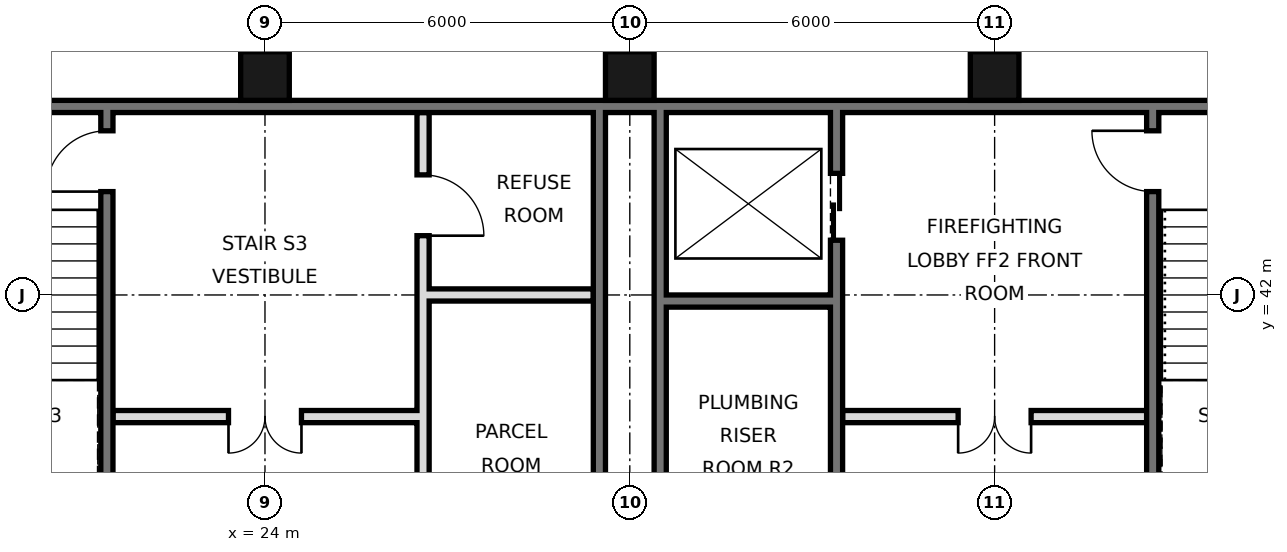
"""IFC4 building model, lengths in metres.
Left out: names, types, materials, properties, quantities, classifications, styles, units other than length and angle.
Written with IfcOpenShell. Run it as: python <this file> out.ifc"""

import sys

from ifc_helpers import new_model, si_unit, direction, frame, frame_2d, origin, origin_2d, place, context, subcontext, project, spatial, rectangle, hollow_rectangle, extrude, element, fill, save


model = new_model("IFC4")
c1 = context("Model", 3, precision=1e-05, world=origin(), true_north=direction((0.0, 1.0)))
c2 = subcontext(c1, "Body", "Model", "MODEL_VIEW")
j1 = project(units=[si_unit("LENGTHUNIT", "METRE"), si_unit("PLANEANGLEUNIT", "RADIAN")], contexts=[c1])
p1 = place(None, origin())
s1 = spatial("IfcSite", under=j1, at=p1, CompositionType="ELEMENT")
p2 = place(p1, origin())
s2 = spatial("IfcBuilding", under=s1, at=p2, CompositionType="ELEMENT")
p3 = place(p2, frame((0.0, 0.0, 308.8)))
s3 = spatial("IfcBuildingStorey", under=s2, at=p3, CompositionType="ELEMENT", Elevation=308.8)
for number, where, z_axis, x_axis in (
    (1, (24.0, 45.6, 0.0), (0.0, 0.0, 1.0), (1.0, 0.0, 0.0)),
    (2, (30.0, 45.6, 0.0), (0.0, 0.0, 1.0), (1.0, 0.0, 0.0)),
    (3, (36.0, 45.6, 0.0), (0.0, 0.0, 1.0), (1.0, 0.0, 0.0)),
):
    element("IfcColumn", number, at=place(p3, frame(where, z_axis=z_axis, x_axis=x_axis)), inside=s3, PredefinedType="COLUMN", context=c2, shape_type="SweptSolid", body=[
        extrude(hollow_rectangle(XDim=0.8, YDim=0.8, WallThickness=0.025, at=origin_2d()), origin(), (0.0, 0.0, 1.0), 3.6),
    ])
p4 = place(p3, frame((6.6, 45.1, 0.0), z_axis=(0.0, 0.0, 1.0), x_axis=(1.0, 0.0, 0.0)))
e4 = element("IfcWall", 4, at=p4, inside=s3, PredefinedType="SOLIDWALL", context=c2, shape_type="SweptSolid", body=[
    extrude(rectangle(XDim=34.8, YDim=0.2, at=frame_2d((17.4, 0.0))), origin(), (0.0, 0.0, 1.0), 3.42),
])
for number, where, z_axis, x_axis in (
    (5, (29.5, 27.6, 0.0), (0.0, 0.0, 1.0), (0.0, 1.0, 0.0)),
    (6, (30.5, 27.6, 0.0), (0.0, 0.0, 1.0), (0.0, 1.0, 0.0)),
):
    element("IfcWall", number, at=place(p3, frame(where, z_axis=z_axis, x_axis=x_axis)), inside=s3, PredefinedType="SOLIDWALL", context=c2, shape_type="SweptSolid", body=[
        extrude(rectangle(XDim=17.5, YDim=0.2, at=frame_2d((8.75, 0.0))), origin(), (0.0, 0.0, 1.0), 3.42),
    ])
p5 = place(p3, frame((21.4, 27.5, 0.0), z_axis=(0.0, 0.0, 1.0), x_axis=(0.0, 1.0, 0.0)))
e7 = element("IfcWall", 7, at=p5, inside=s3, PredefinedType="SOLIDWALL", context=c2, shape_type="SweptSolid", body=[
    extrude(rectangle(XDim=17.5, YDim=0.2, at=frame_2d((8.75, 0.0))), origin(), (0.0, 0.0, 1.0), 3.42),
])
p6 = place(p5, frame((0.55, 0.0, 0.0)))
e8 = element("IfcOpeningElement", 8, at=p6, cuts=e7, PredefinedType="OPENING", context=c2, shape_type="SweptSolid", body=[
    extrude(rectangle(XDim=1.0, YDim=2.1, at=frame_2d((0.5, 1.05))), frame((0.0, 0.11, 0.0), z_axis=(0.0, -1.0, 0.0), x_axis=(1.0, 0.0, 0.0)), (0.0, 0.0, 1.0), 0.22),
])
p7 = place(p5, frame((3.65, 0.0, 0.0)))
e9 = element("IfcOpeningElement", 9, at=p7, cuts=e7, PredefinedType="OPENING", context=c2, shape_type="SweptSolid", body=[
    extrude(rectangle(XDim=1.0, YDim=2.1, at=frame_2d((0.5, 1.05))), frame((0.0, 0.11, 0.0), z_axis=(0.0, -1.0, 0.0), x_axis=(1.0, 0.0, 0.0)), (0.0, 0.0, 1.0), 0.22),
])
p8 = place(p5, frame((16.2, 0.0, 0.0)))
e10 = element("IfcOpeningElement", 10, at=p8, cuts=e7, PredefinedType="OPENING", context=c2, shape_type="SweptSolid", body=[
    extrude(rectangle(XDim=1.0, YDim=2.1, at=frame_2d((0.5, 1.05))), frame((0.0, 0.11, 0.0), z_axis=(0.0, -1.0, 0.0), x_axis=(1.0, 0.0, 0.0)), (0.0, 0.0, 1.0), 0.22),
])
p9 = place(p5, frame((7.4, 0.0, 0.0)))
e11 = element("IfcOpeningElement", 11, at=p9, cuts=e7, PredefinedType="OPENING", context=c2, shape_type="SweptSolid", body=[
    extrude(rectangle(XDim=0.9, YDim=2.1, at=frame_2d((0.45, 1.05))), frame((0.0, 0.11, 0.0), z_axis=(0.0, -1.0, 0.0), x_axis=(1.0, 0.0, 0.0)), (0.0, 0.0, 1.0), 0.22),
])
p10 = place(p3, frame((26.6, 27.5, 0.0), z_axis=(0.0, 0.0, 1.0), x_axis=(0.0, 1.0, 0.0)))
e12 = element("IfcWall", 12, at=p10, inside=s3, PredefinedType="SOLIDWALL", context=c2, shape_type="SweptSolid", body=[
    extrude(rectangle(XDim=17.5, YDim=0.2, at=frame_2d((8.75, 0.0))), origin(), (0.0, 0.0, 1.0), 3.42),
])
p11 = place(p10, frame((4.3, 0.0, 0.0)))
e13 = element("IfcOpeningElement", 13, at=p11, cuts=e12, PredefinedType="OPENING", context=c2, shape_type="SweptSolid", body=[
    extrude(rectangle(XDim=0.9, YDim=2.1, at=frame_2d((0.45, 1.05))), frame((0.0, 0.11, 0.0), z_axis=(0.0, -1.0, 0.0), x_axis=(1.0, 0.0, 0.0)), (0.0, 0.0, 1.0), 0.22),
])
p12 = place(p10, frame((10.35, 0.0, 0.0)))
e14 = element("IfcOpeningElement", 14, at=p12, cuts=e12, PredefinedType="OPENING", context=c2, shape_type="SweptSolid", body=[
    extrude(rectangle(XDim=1.0, YDim=2.1, at=frame_2d((0.5, 1.05))), frame((0.0, 0.11, 0.0), z_axis=(0.0, -1.0, 0.0), x_axis=(1.0, 0.0, 0.0)), (0.0, 0.0, 1.0), 0.22),
])
p13 = place(p10, frame((15.475, 0.0, 0.0)))
e15 = element("IfcOpeningElement", 15, at=p13, cuts=e12, PredefinedType="OPENING", context=c2, shape_type="SweptSolid", body=[
    extrude(rectangle(XDim=1.0, YDim=2.1, at=frame_2d((0.5, 1.05))), frame((0.0, 0.11, 0.0), z_axis=(0.0, -1.0, 0.0), x_axis=(1.0, 0.0, 0.0)), (0.0, 0.0, 1.0), 0.22),
])
p14 = place(p3, frame((33.4, 27.5, 0.0), z_axis=(0.0, 0.0, 1.0), x_axis=(0.0, 1.0, 0.0)))
e16 = element("IfcWall", 16, at=p14, inside=s3, PredefinedType="SOLIDWALL", context=c2, shape_type="SweptSolid", body=[
    extrude(rectangle(XDim=17.5, YDim=0.2, at=frame_2d((8.75, 0.0))), origin(), (0.0, 0.0, 1.0), 3.42),
])
p15 = place(p14, frame((1.1, 0.0, 0.0)))
e17 = element("IfcOpeningElement", 17, at=p15, cuts=e16, PredefinedType="OPENING", context=c2, shape_type="SweptSolid", body=[
    extrude(rectangle(XDim=1.1, YDim=2.1, at=frame_2d((0.55, 1.05))), frame((0.0, 0.11, 0.0), z_axis=(0.0, -1.0, 0.0), x_axis=(1.0, 0.0, 0.0)), (0.0, 0.0, 1.0), 0.22),
])
p16 = place(p14, frame((4.2, 0.0, 0.0)))
e18 = element("IfcOpeningElement", 18, at=p16, cuts=e16, PredefinedType="OPENING", context=c2, shape_type="SweptSolid", body=[
    extrude(rectangle(XDim=1.1, YDim=2.1, at=frame_2d((0.55, 1.05))), frame((0.0, 0.11, 0.0), z_axis=(0.0, -1.0, 0.0), x_axis=(1.0, 0.0, 0.0)), (0.0, 0.0, 1.0), 0.22),
])
p17 = place(p14, frame((15.4, 0.0, 0.0)))
e19 = element("IfcOpeningElement", 19, at=p17, cuts=e16, PredefinedType="OPENING", context=c2, shape_type="SweptSolid", body=[
    extrude(rectangle(XDim=1.1, YDim=2.1, at=frame_2d((0.55, 1.05))), frame((0.0, 0.11, 0.0), z_axis=(0.0, -1.0, 0.0), x_axis=(1.0, 0.0, 0.0)), (0.0, 0.0, 1.0), 0.22),
])
p18 = place(p14, frame((9.9, 0.0, 0.0)))
e20 = element("IfcOpeningElement", 20, at=p18, cuts=e16, PredefinedType="OPENING", context=c2, shape_type="SweptSolid", body=[
    extrude(rectangle(XDim=0.9, YDim=2.1, at=frame_2d((0.45, 1.05))), frame((0.0, 0.11, 0.0), z_axis=(0.0, -1.0, 0.0), x_axis=(1.0, 0.0, 0.0)), (0.0, 0.0, 1.0), 0.22),
])
p19 = place(p3, frame((38.6, 21.6, 0.0), z_axis=(0.0, 0.0, 1.0), x_axis=(0.0, 1.0, 0.0)))
e21 = element("IfcWall", 21, at=p19, inside=s3, PredefinedType="SOLIDWALL", context=c2, shape_type="SweptSolid", body=[
    extrude(rectangle(XDim=23.4, YDim=0.2, at=frame_2d((11.7, 0.0))), origin(), (0.0, 0.0, 1.0), 3.42),
])
p20 = place(p19, frame((7.0, 0.0, 0.0)))
e22 = element("IfcOpeningElement", 22, at=p20, cuts=e21, PredefinedType="OPENING", context=c2, shape_type="SweptSolid", body=[
    extrude(rectangle(XDim=1.1, YDim=2.1, at=frame_2d((0.55, 1.05))), frame((0.0, 0.11, 0.0), z_axis=(0.0, -1.0, 0.0), x_axis=(1.0, 0.0, 0.0)), (0.0, 0.0, 1.0), 0.22),
])
p21 = place(p19, frame((10.1, 0.0, 0.0)))
e23 = element("IfcOpeningElement", 23, at=p21, cuts=e21, PredefinedType="OPENING", context=c2, shape_type="SweptSolid", body=[
    extrude(rectangle(XDim=1.1, YDim=2.1, at=frame_2d((0.55, 1.05))), frame((0.0, 0.11, 0.0), z_axis=(0.0, -1.0, 0.0), x_axis=(1.0, 0.0, 0.0)), (0.0, 0.0, 1.0), 0.22),
])
p22 = place(p19, frame((13.2, 0.0, 0.0)))
e24 = element("IfcOpeningElement", 24, at=p22, cuts=e21, PredefinedType="OPENING", context=c2, shape_type="SweptSolid", body=[
    extrude(rectangle(XDim=1.1, YDim=2.1, at=frame_2d((0.55, 1.05))), frame((0.0, 0.11, 0.0), z_axis=(0.0, -1.0, 0.0), x_axis=(1.0, 0.0, 0.0)), (0.0, 0.0, 1.0), 0.22),
])
p23 = place(p19, frame((22.1, 0.0, 0.0)))
e25 = element("IfcOpeningElement", 25, at=p23, cuts=e21, PredefinedType="OPENING", context=c2, shape_type="SweptSolid", body=[
    extrude(rectangle(XDim=1.0, YDim=2.1, at=frame_2d((0.5, 1.05))), frame((0.0, 0.11, 0.0), z_axis=(0.0, -1.0, 0.0), x_axis=(1.0, 0.0, 0.0)), (0.0, 0.0, 1.0), 0.22),
])
p24 = place(p19, frame((0.175, 0.0, 0.0)))
e26 = element("IfcOpeningElement", 26, at=p24, cuts=e21, PredefinedType="OPENING", context=c2, shape_type="SweptSolid", body=[
    extrude(rectangle(XDim=0.9, YDim=2.1, at=frame_2d((0.45, 1.05))), frame((0.0, 0.11, 0.0), z_axis=(0.0, -1.0, 0.0), x_axis=(1.0, 0.0, 0.0)), (0.0, 0.0, 1.0), 0.22),
])
p25 = place(p3, frame((21.5, 40.0, 0.0), z_axis=(0.0, 0.0, 1.0), x_axis=(1.0, 0.0, 0.0)))
e27 = element("IfcWall", 27, at=p25, inside=s3, PredefinedType="PARTITIONING", context=c2, shape_type="SweptSolid", body=[
    extrude(rectangle(XDim=5.0, YDim=0.2, at=frame_2d((2.5, 0.0))), origin(), (0.0, 0.0, 1.0), 3.42),
])
p26 = place(p25, frame((1.9, 0.0, 0.0)))
e28 = element("IfcOpeningElement", 28, at=p26, cuts=e27, PredefinedType="OPENING", context=c2, shape_type="SweptSolid", body=[
    extrude(rectangle(XDim=1.2, YDim=2.1, at=frame_2d((0.6, 1.05))), frame((0.0, 0.11, 0.0), z_axis=(0.0, -1.0, 0.0), x_axis=(1.0, 0.0, 0.0)), (0.0, 0.0, 1.0), 0.22),
])
p27 = place(p3, frame((33.5, 40.0, 0.0), z_axis=(0.0, 0.0, 1.0), x_axis=(1.0, 0.0, 0.0)))
e29 = element("IfcWall", 29, at=p27, inside=s3, PredefinedType="PARTITIONING", context=c2, shape_type="SweptSolid", body=[
    extrude(rectangle(XDim=5.0, YDim=0.2, at=frame_2d((2.5, 0.0))), origin(), (0.0, 0.0, 1.0), 3.42),
])
p28 = place(p27, frame((1.9, 0.0, 0.0)))
e30 = element("IfcOpeningElement", 30, at=p28, cuts=e29, PredefinedType="OPENING", context=c2, shape_type="SweptSolid", body=[
    extrude(rectangle(XDim=1.2, YDim=2.1, at=frame_2d((0.6, 1.05))), frame((0.0, 0.11, 0.0), z_axis=(0.0, -1.0, 0.0), x_axis=(1.0, 0.0, 0.0)), (0.0, 0.0, 1.0), 0.22),
])
p29 = place(p3, frame((30.6, 41.9, 0.0), z_axis=(0.0, 0.0, 1.0), x_axis=(1.0, 0.0, 0.0)))
e31 = element("IfcWall", 31, at=p29, inside=s3, PredefinedType="SOLIDWALL", context=c2, shape_type="SweptSolid", body=[
    extrude(rectangle(XDim=2.7, YDim=0.2, at=frame_2d((1.35, 0.0))), origin(), (0.0, 0.0, 1.0), 3.42),
])
p30 = place(p3, frame((26.7, 42.0, 0.0), z_axis=(0.0, 0.0, 1.0), x_axis=(1.0, 0.0, 0.0)))
e32 = element("IfcWall", 32, at=p30, inside=s3, PredefinedType="PARTITIONING", context=c2, shape_type="SweptSolid", body=[
    extrude(rectangle(XDim=2.7, YDim=0.2, at=frame_2d((1.35, 0.0))), origin(), (0.0, 0.0, 1.0), 3.42),
])
p31 = place(p26, frame((1.2, 0.0, 0.0), z_axis=(0.0, 0.0, 1.0), x_axis=(-1.0, 0.0, 0.0)))
e33 = element("IfcDoor", 33, at=p31, inside=s3, OperationType="DOUBLE_DOOR_SINGLE_SWING", PredefinedType="DOOR", context=c2, shape_type="SweptSolid", body=[
    extrude(rectangle(XDim=1.2, YDim=2.1, at=frame_2d((0.6, 1.05))), frame((0.0, 0.025, 0.0), z_axis=(0.0, -1.0, 0.0), x_axis=(1.0, 0.0, 0.0)), (0.0, 0.0, 1.0), 0.05),
])
fill(e28, e33)
p32 = place(p28, frame((1.2, 0.0, 0.0), z_axis=(0.0, 0.0, 1.0), x_axis=(-1.0, 0.0, 0.0)))
e34 = element("IfcDoor", 34, at=p32, inside=s3, OperationType="DOUBLE_DOOR_SINGLE_SWING", PredefinedType="DOOR", context=c2, shape_type="SweptSolid", body=[
    extrude(rectangle(XDim=1.2, YDim=2.1, at=frame_2d((0.6, 1.05))), frame((0.0, 0.025, 0.0), z_axis=(0.0, -1.0, 0.0), x_axis=(1.0, 0.0, 0.0)), (0.0, 0.0, 1.0), 0.05),
])
fill(e30, e34)
p33 = place(p17, origin())
e35 = element("IfcDoor", 35, at=p33, inside=s3, OperationType="DOUBLE_DOOR_SLIDING", PredefinedType="DOOR", context=c2, shape_type="SweptSolid", body=[
    extrude(rectangle(XDim=1.1, YDim=2.1, at=frame_2d((0.55, 1.05))), frame((0.0, 0.025, 0.0), z_axis=(0.0, -1.0, 0.0), x_axis=(1.0, 0.0, 0.0)), (0.0, 0.0, 1.0), 0.05),
])
fill(e19, e35)
p34 = place(p23, frame((1.0, 0.0, 0.0), z_axis=(0.0, 0.0, 1.0), x_axis=(-1.0, 0.0, 0.0)))
e36 = element("IfcDoor", 36, at=p34, inside=s3, OperationType="SINGLE_SWING_LEFT", PredefinedType="DOOR", context=c2, shape_type="SweptSolid", body=[
    extrude(rectangle(XDim=1.0, YDim=2.1, at=frame_2d((0.5, 1.05))), frame((0.0, 0.025, 0.0), z_axis=(0.0, -1.0, 0.0), x_axis=(1.0, 0.0, 0.0)), (0.0, 0.0, 1.0), 0.05),
])
fill(e25, e36)
p35 = place(p8, origin())
e37 = element("IfcDoor", 37, at=p35, inside=s3, OperationType="SINGLE_SWING_LEFT", PredefinedType="DOOR", context=c2, shape_type="SweptSolid", body=[
    extrude(rectangle(XDim=1.0, YDim=2.1, at=frame_2d((0.5, 1.05))), frame((0.0, 0.025, 0.0), z_axis=(0.0, -1.0, 0.0), x_axis=(1.0, 0.0, 0.0)), (0.0, 0.0, 1.0), 0.05),
])
fill(e10, e37)
p36 = place(p13, frame((1.0, 0.0, 0.0), z_axis=(0.0, 0.0, 1.0), x_axis=(-1.0, 0.0, 0.0)))
e38 = element("IfcDoor", 38, at=p36, inside=s3, OperationType="SINGLE_SWING_RIGHT", PredefinedType="DOOR", context=c2, shape_type="SweptSolid", body=[
    extrude(rectangle(XDim=1.0, YDim=2.1, at=frame_2d((0.5, 1.05))), frame((0.0, 0.025, 0.0), z_axis=(0.0, -1.0, 0.0), x_axis=(1.0, 0.0, 0.0)), (0.0, 0.0, 1.0), 0.05),
])
fill(e15, e38)
save(model, sys.argv[1])
